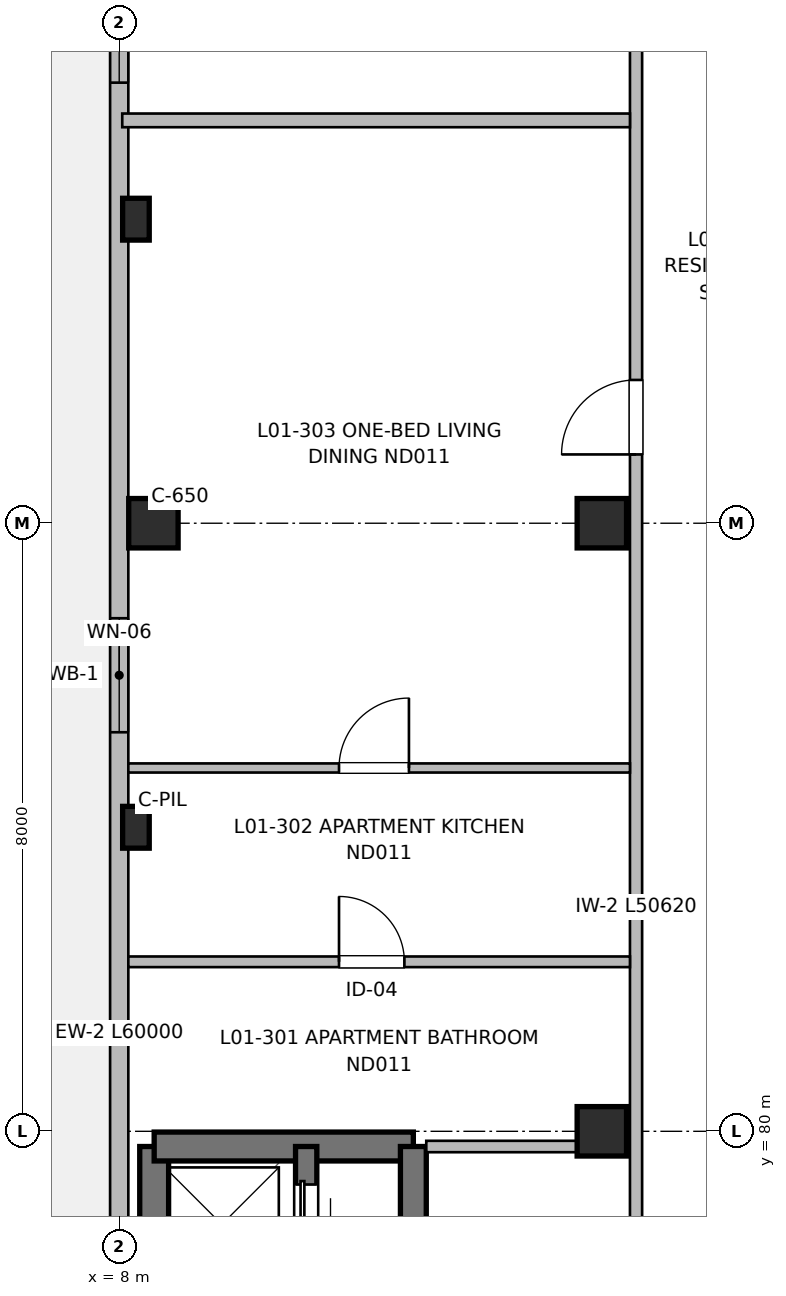
"""IFC4 building model, lengths in metres.
Left out: names, types, materials, properties, quantities, classifications, styles, units other than length and angle.
Written with IfcOpenShell. Run it as: python <this file> out.ifc"""

import sys

from ifc_helpers import new_model, si_unit, direction, frame, frame_2d, origin, origin_2d, place, context, subcontext, project, spatial, rectangle, extrude, element, fill, save


model = new_model("IFC4")
c1 = context("Model", 3, precision=1e-05, world=origin(), true_north=direction((0.0, 1.0)))
c2 = subcontext(c1, "Body", "Model", "MODEL_VIEW")
j1 = project(units=[si_unit("LENGTHUNIT", "METRE"), si_unit("PLANEANGLEUNIT", "RADIAN")], contexts=[c1])
p1 = place(None, origin())
s1 = spatial("IfcSite", under=j1, at=p1, CompositionType="ELEMENT")
p2 = place(p1, origin())
s2 = spatial("IfcBuilding", under=s1, at=p2, CompositionType="ELEMENT")
p3 = place(p2, frame((0.0, 0.0, 4.16)))
s3 = spatial("IfcBuildingStorey", under=s2, at=p3, CompositionType="ELEMENT", Elevation=4.16)
for number, where, z_axis, x_axis in (
    (1, (8.22, 84.0, 0.0), (0.0, 0.0, 1.0), (1.0, 0.0, 0.0)),
    (2, (8.22, 92.0, 0.0), (0.0, 0.0, 1.0), (1.0, 0.0, 0.0)),
):
    element("IfcColumn", number, at=place(p3, frame(where, z_axis=z_axis, x_axis=x_axis)), inside=s3, PredefinedType="PILASTER", context=c2, shape_type="SweptSolid", body=[
        extrude(rectangle(XDim=0.35, YDim=0.55, at=origin_2d()), origin(), (0.0, 0.0, 1.0), 3.2),
    ])
for number, where, z_axis, x_axis in (
    (3, (8.45, 88.0, 0.0), (0.0, 0.0, 1.0), (1.0, 0.0, 0.0)),
    (4, (14.35, 80.0, 0.0), (0.0, 0.0, 1.0), (1.0, 0.0, 0.0)),
    (5, (14.35, 88.0, 0.0), (0.0, 0.0, 1.0), (1.0, 0.0, 0.0)),
):
    element("IfcColumn", number, at=place(p3, frame(where, z_axis=z_axis, x_axis=x_axis)), inside=s3, PredefinedType="COLUMN", context=c2, shape_type="SweptSolid", body=[
        extrude(rectangle(XDim=0.65, YDim=0.65, at=origin_2d()), origin(), (0.0, 0.0, 1.0), 3.2),
    ])
p4 = place(p3, frame((8.46, 67.35, 0.0), z_axis=(0.0, 0.0, 1.0), x_axis=(0.0, 1.0, 0.0)))
e6 = element("IfcWall", 6, at=p4, inside=s3, PredefinedType="SHEAR", context=c2, shape_type="SweptSolid", body=[
    extrude(rectangle(XDim=12.45, YDim=0.38, at=frame_2d((6.225, 0.0))), origin(), (0.0, 0.0, 1.0), 3.2),
])
p5 = place(p4, frame((2.2, 0.0, 0.97)))
e7 = element("IfcOpeningElement", 7, at=p5, cuts=e6, PredefinedType="OPENING", context=c2, shape_type="SweptSolid", body=[
    extrude(rectangle(XDim=0.95, YDim=1.25, at=frame_2d((0.475, 0.625))), frame((0.0, 0.2, 0.0), z_axis=(0.0, -1.0, 0.0), x_axis=(1.0, 0.0, 0.0)), (0.0, 0.0, 1.0), 0.4),
])
p6 = place(p3, frame((8.46, 79.8, 0.0), z_axis=(0.0, 0.0, 1.0), x_axis=(1.0, 0.0, 0.0)))
e8 = element("IfcWall", 8, at=p6, inside=s3, PredefinedType="SHEAR", context=c2, shape_type="SweptSolid", body=[
    extrude(rectangle(XDim=3.41, YDim=0.38, at=frame_2d((1.705, 0.0))), origin(), (0.0, 0.0, 1.0), 3.2),
])
p7 = place(p3, frame((11.87, 79.8, 0.0), z_axis=(0.0, 0.0, 1.0), x_axis=(0.0, -1.0, 0.0)))
e9 = element("IfcWall", 9, at=p7, inside=s3, PredefinedType="SHEAR", context=c2, shape_type="SweptSolid", body=[
    extrude(rectangle(XDim=12.45, YDim=0.34, at=frame_2d((6.225, 0.0))), origin(), (0.0, 0.0, 1.0), 3.2),
])
p8 = place(p7, frame((10.85, 0.0, 0.0)))
e10 = element("IfcOpeningElement", 10, at=p8, cuts=e9, PredefinedType="OPENING", context=c2, shape_type="SweptSolid", body=[
    extrude(rectangle(XDim=1.05, YDim=2.15, at=frame_2d((0.525, 1.075))), frame((0.0, 0.18, 0.0), z_axis=(0.0, -1.0, 0.0), x_axis=(1.0, 0.0, 0.0)), (0.0, 0.0, 1.0), 0.36),
])
p9 = place(p3, frame((10.46, 74.55, 0.0), z_axis=(0.0, 0.0, 1.0), x_axis=(0.0, 1.0, 0.0)))
e11 = element("IfcWall", 11, at=p9, inside=s3, PredefinedType="SHEAR", context=c2, shape_type="SweptSolid", body=[
    extrude(rectangle(XDim=5.25, YDim=0.28, at=frame_2d((2.625, 0.0))), origin(), (0.0, 0.0, 1.0), 3.2),
])
p10 = place(p9, frame((1.15, 0.0, 0.0)))
e12 = element("IfcOpeningElement", 12, at=p10, cuts=e11, PredefinedType="OPENING", context=c2, shape_type="SweptSolid", body=[
    extrude(rectangle(XDim=1.0, YDim=2.15, at=frame_2d((0.5, 1.075))), frame((0.0, 0.15, 0.0), z_axis=(0.0, -1.0, 0.0), x_axis=(1.0, 0.0, 0.0)), (0.0, 0.0, 1.0), 0.3),
])
p11 = place(p9, frame((3.85, 0.0, 0.0)))
e13 = element("IfcOpeningElement", 13, at=p11, cuts=e11, PredefinedType="OPENING", context=c2, shape_type="SweptSolid", body=[
    extrude(rectangle(XDim=0.9, YDim=2.15, at=frame_2d((0.45, 1.075))), frame((0.0, 0.15, 0.0), z_axis=(0.0, -1.0, 0.0), x_axis=(1.0, 0.0, 0.0)), (0.0, 0.0, 1.0), 0.3),
])
p12 = place(p3, frame((8.0, 56.0, 0.0), z_axis=(0.0, 0.0, 1.0), x_axis=(0.0, 1.0, 0.0)))
e14 = element("IfcWall", 14, at=p12, inside=s3, PredefinedType="SOLIDWALL", context=c2, shape_type="SweptSolid", body=[
    extrude(rectangle(XDim=60.0, YDim=0.24, at=frame_2d((30.0, 0.0))), origin(), (0.0, 0.0, 1.0), 2.98),
])
p13 = place(p12, frame((4.886, 0.0, 0.0)))
e15 = element("IfcOpeningElement", 15, at=p13, cuts=e14, PredefinedType="OPENING", context=c2, shape_type="SweptSolid", body=[
    extrude(rectangle(XDim=1.2, YDim=2.2, at=frame_2d((0.6, 1.1))), frame((0.0, 0.13, 0.0), z_axis=(0.0, -1.0, 0.0), x_axis=(1.0, 0.0, 0.0)), (0.0, 0.0, 1.0), 0.26),
])
p14 = place(p12, frame((12.057, 0.0, 0.77)))
e16 = element("IfcOpeningElement", 16, at=p14, cuts=e14, PredefinedType="OPENING", context=c2, shape_type="SweptSolid", body=[
    extrude(rectangle(XDim=1.6, YDim=1.45, at=frame_2d((0.8, 0.725))), frame((0.0, 0.13, 0.0), z_axis=(0.0, -1.0, 0.0), x_axis=(1.0, 0.0, 0.0)), (0.0, 0.0, 1.0), 0.26),
])
p15 = place(p12, frame((18.929, 0.0, 0.72)))
e17 = element("IfcOpeningElement", 17, at=p15, cuts=e14, PredefinedType="OPENING", context=c2, shape_type="SweptSolid", body=[
    extrude(rectangle(XDim=2.4, YDim=1.5, at=frame_2d((1.2, 0.75))), frame((0.0, 0.13, 0.0), z_axis=(0.0, -1.0, 0.0), x_axis=(1.0, 0.0, 0.0)), (0.0, 0.0, 1.0), 0.26),
])
p16 = place(p12, frame((29.25, 0.0, 0.82)))
e18 = element("IfcOpeningElement", 18, at=p16, cuts=e14, PredefinedType="OPENING", context=c2, shape_type="SweptSolid", body=[
    extrude(rectangle(XDim=1.5, YDim=1.4, at=frame_2d((0.75, 0.7))), frame((0.0, 0.13, 0.0), z_axis=(0.0, -1.0, 0.0), x_axis=(1.0, 0.0, 0.0)), (0.0, 0.0, 1.0), 0.26),
])
p17 = place(p12, frame((37.796, 0.0, 0.82)))
e19 = element("IfcOpeningElement", 19, at=p17, cuts=e14, PredefinedType="OPENING", context=c2, shape_type="SweptSolid", body=[
    extrude(rectangle(XDim=1.55, YDim=1.4, at=frame_2d((0.775, 0.7))), frame((0.0, 0.13, 0.0), z_axis=(0.0, -1.0, 0.0), x_axis=(1.0, 0.0, 0.0)), (0.0, 0.0, 1.0), 0.26),
])
p18 = place(p12, frame((46.443, 0.0, 0.87)))
e20 = element("IfcOpeningElement", 20, at=p18, cuts=e14, PredefinedType="OPENING", context=c2, shape_type="SweptSolid", body=[
    extrude(rectangle(XDim=1.4, YDim=1.35, at=frame_2d((0.7, 0.675))), frame((0.0, 0.13, 0.0), z_axis=(0.0, -1.0, 0.0), x_axis=(1.0, 0.0, 0.0)), (0.0, 0.0, 1.0), 0.26),
])
p19 = place(p12, frame((55.539, 0.0, 0.87)))
e21 = element("IfcOpeningElement", 21, at=p19, cuts=e14, PredefinedType="OPENING", context=c2, shape_type="SweptSolid", body=[
    extrude(rectangle(XDim=1.25, YDim=1.35, at=frame_2d((0.625, 0.675))), frame((0.0, 0.13, 0.0), z_axis=(0.0, -1.0, 0.0), x_axis=(1.0, 0.0, 0.0)), (0.0, 0.0, 1.0), 0.26),
])
p20 = place(p3, frame((12.04, 79.8, 0.0), z_axis=(0.0, 0.0, 1.0), x_axis=(1.0, 0.0, 0.0)))
e22 = element("IfcWall", 22, at=p20, inside=s3, PredefinedType="PARTITIONING", context=c2, shape_type="SweptSolid", body=[
    extrude(rectangle(XDim=2.68, YDim=0.15, at=frame_2d((1.34, 0.0))), origin(), (0.0, 0.0, 1.0), 2.935),
])
p21 = place(p3, frame((14.8, 56.18, 0.0), z_axis=(0.0, 0.0, 1.0), x_axis=(0.0, 1.0, 0.0)))
e23 = element("IfcWall", 23, at=p21, inside=s3, PredefinedType="PARTITIONING", context=c2, shape_type="SweptSolid", body=[
    extrude(rectangle(XDim=50.62, YDim=0.16, at=frame_2d((25.31, 0.0))), origin(), (0.0, 0.0, 1.0), 2.935),
])
p22 = place(p21, frame((12.82, 0.0, 0.0)))
e24 = element("IfcOpeningElement", 24, at=p22, cuts=e23, PredefinedType="OPENING", context=c2, shape_type="SweptSolid", body=[
    extrude(rectangle(XDim=1.1, YDim=2.15, at=frame_2d((0.55, 1.075))), frame((0.0, 0.09, 0.0), z_axis=(0.0, -1.0, 0.0), x_axis=(1.0, 0.0, 0.0)), (0.0, 0.0, 1.0), 0.18),
])
p23 = place(p21, frame((19.22, 0.0, 0.0)))
e25 = element("IfcOpeningElement", 25, at=p23, cuts=e23, PredefinedType="OPENING", context=c2, shape_type="SweptSolid", body=[
    extrude(rectangle(XDim=1.6, YDim=2.15, at=frame_2d((0.8, 1.075))), frame((0.0, 0.09, 0.0), z_axis=(0.0, -1.0, 0.0), x_axis=(1.0, 0.0, 0.0)), (0.0, 0.0, 1.0), 0.18),
])
p24 = place(p21, frame((1.8, 0.0, 0.0)))
e26 = element("IfcOpeningElement", 26, at=p24, cuts=e23, PredefinedType="OPENING", context=c2, shape_type="SweptSolid", body=[
    extrude(rectangle(XDim=0.96, YDim=2.15, at=frame_2d((0.48, 1.075))), frame((0.0, 0.09, 0.0), z_axis=(0.0, -1.0, 0.0), x_axis=(1.0, 0.0, 0.0)), (0.0, 0.0, 1.0), 0.18),
])
p25 = place(p21, frame((32.725, 0.0, 0.0)))
e27 = element("IfcOpeningElement", 27, at=p25, cuts=e23, PredefinedType="OPENING", context=c2, shape_type="SweptSolid", body=[
    extrude(rectangle(XDim=0.98, YDim=2.15, at=frame_2d((0.49, 1.075))), frame((0.0, 0.09, 0.0), z_axis=(0.0, -1.0, 0.0), x_axis=(1.0, 0.0, 0.0)), (0.0, 0.0, 1.0), 0.18),
])
p26 = place(p21, frame((40.935, 0.0, 0.0)))
e28 = element("IfcOpeningElement", 28, at=p26, cuts=e23, PredefinedType="OPENING", context=c2, shape_type="SweptSolid", body=[
    extrude(rectangle(XDim=0.98, YDim=2.15, at=frame_2d((0.49, 1.075))), frame((0.0, 0.09, 0.0), z_axis=(0.0, -1.0, 0.0), x_axis=(1.0, 0.0, 0.0)), (0.0, 0.0, 1.0), 0.18),
])
p27 = place(p3, frame((8.04, 93.3, 0.0), z_axis=(0.0, 0.0, 1.0), x_axis=(1.0, 0.0, 0.0)))
e29 = element("IfcWall", 29, at=p27, inside=s3, PredefinedType="PARTITIONING", context=c2, shape_type="SweptSolid", body=[
    extrude(rectangle(XDim=6.68, YDim=0.18, at=frame_2d((3.34, 0.0))), origin(), (0.0, 0.0, 1.0), 2.935),
])
p28 = place(p3, frame((8.12, 82.23, 0.0), z_axis=(0.0, 0.0, 1.0), x_axis=(1.0, 0.0, 0.0)))
e30 = element("IfcWall", 30, at=p28, inside=s3, PredefinedType="PARTITIONING", context=c2, shape_type="SweptSolid", body=[
    extrude(rectangle(XDim=6.6, YDim=0.14, at=frame_2d((3.3, 0.0))), origin(), (0.0, 0.0, 1.0), 2.935),
])
p29 = place(p28, frame((2.772, 0.0, 0.0)))
e31 = element("IfcOpeningElement", 31, at=p29, cuts=e30, PredefinedType="OPENING", context=c2, shape_type="SweptSolid", body=[
    extrude(rectangle(XDim=0.86, YDim=2.1, at=frame_2d((0.43, 1.05))), frame((0.0, 0.08, 0.0), z_axis=(0.0, -1.0, 0.0), x_axis=(1.0, 0.0, 0.0)), (0.0, 0.0, 1.0), 0.16),
])
p30 = place(p3, frame((8.12, 84.78, 0.0), z_axis=(0.0, 0.0, 1.0), x_axis=(1.0, 0.0, 0.0)))
e32 = element("IfcWall", 32, at=p30, inside=s3, PredefinedType="PARTITIONING", context=c2, shape_type="SweptSolid", body=[
    extrude(rectangle(XDim=6.6, YDim=0.12, at=frame_2d((3.3, 0.0))), origin(), (0.0, 0.0, 1.0), 2.935),
])
p31 = place(p30, frame((2.772, 0.0, 0.0)))
e33 = element("IfcOpeningElement", 33, at=p31, cuts=e32, PredefinedType="OPENING", context=c2, shape_type="SweptSolid", body=[
    extrude(rectangle(XDim=0.92, YDim=2.1, at=frame_2d((0.46, 1.05))), frame((0.0, 0.07, 0.0), z_axis=(0.0, -1.0, 0.0), x_axis=(1.0, 0.0, 0.0)), (0.0, 0.0, 1.0), 0.14),
])
p32 = place(p11, origin())
e34 = element("IfcDoor", 34, at=p32, inside=s3, OperationType="SLIDING_TO_RIGHT", PredefinedType="DOOR", context=c2, shape_type="SweptSolid", body=[
    extrude(rectangle(XDim=0.9, YDim=2.15, at=frame_2d((0.45, 1.075))), frame((0.0, 0.025, 0.0), z_axis=(0.0, -1.0, 0.0), x_axis=(1.0, 0.0, 0.0)), (0.0, 0.0, 1.0), 0.05),
])
fill(e13, e34)
p33 = place(p16, origin())
e35 = element("IfcWindow", 35, at=p33, inside=s3, PartitioningType="SINGLE_PANEL", PredefinedType="WINDOW", context=c2, shape_type="SweptSolid", body=[
    extrude(rectangle(XDim=1.5, YDim=1.4, at=frame_2d((0.75, 0.7))), frame((0.0, 0.03, 0.0), z_axis=(0.0, -1.0, 0.0), x_axis=(1.0, 0.0, 0.0)), (0.0, 0.0, 1.0), 0.06),
])
fill(e18, e35)
p34 = place(p17, origin())
e36 = element("IfcWindow", 36, at=p34, inside=s3, PartitioningType="SINGLE_PANEL", PredefinedType="WINDOW", context=c2, shape_type="SweptSolid", body=[
    extrude(rectangle(XDim=1.55, YDim=1.4, at=frame_2d((0.775, 0.7))), frame((0.0, 0.03, 0.0), z_axis=(0.0, -1.0, 0.0), x_axis=(1.0, 0.0, 0.0)), (0.0, 0.0, 1.0), 0.06),
])
fill(e19, e36)
p35 = place(p29, origin())
e37 = element("IfcDoor", 37, at=p35, inside=s3, OperationType="SINGLE_SWING_LEFT", PredefinedType="DOOR", context=c2, shape_type="SweptSolid", body=[
    extrude(rectangle(XDim=0.86, YDim=2.1, at=frame_2d((0.43, 1.05))), frame((0.0, 0.025, 0.0), z_axis=(0.0, -1.0, 0.0), x_axis=(1.0, 0.0, 0.0)), (0.0, 0.0, 1.0), 0.05),
])
fill(e31, e37)
p36 = place(p31, origin())
e38 = element("IfcDoor", 38, at=p36, inside=s3, OperationType="SINGLE_SWING_RIGHT", PredefinedType="DOOR", context=c2, shape_type="SweptSolid", body=[
    extrude(rectangle(XDim=0.92, YDim=2.1, at=frame_2d((0.46, 1.05))), frame((0.0, 0.025, 0.0), z_axis=(0.0, -1.0, 0.0), x_axis=(1.0, 0.0, 0.0)), (0.0, 0.0, 1.0), 0.05),
])
fill(e33, e38)
p37 = place(p25, origin())
e39 = element("IfcDoor", 39, at=p37, inside=s3, OperationType="SINGLE_SWING_LEFT", PredefinedType="DOOR", context=c2, shape_type="SweptSolid", body=[
    extrude(rectangle(XDim=0.98, YDim=2.15, at=frame_2d((0.49, 1.075))), frame((0.0, 0.025, 0.0), z_axis=(0.0, -1.0, 0.0), x_axis=(1.0, 0.0, 0.0)), (0.0, 0.0, 1.0), 0.05),
])
fill(e27, e39)
save(model, sys.argv[1])
